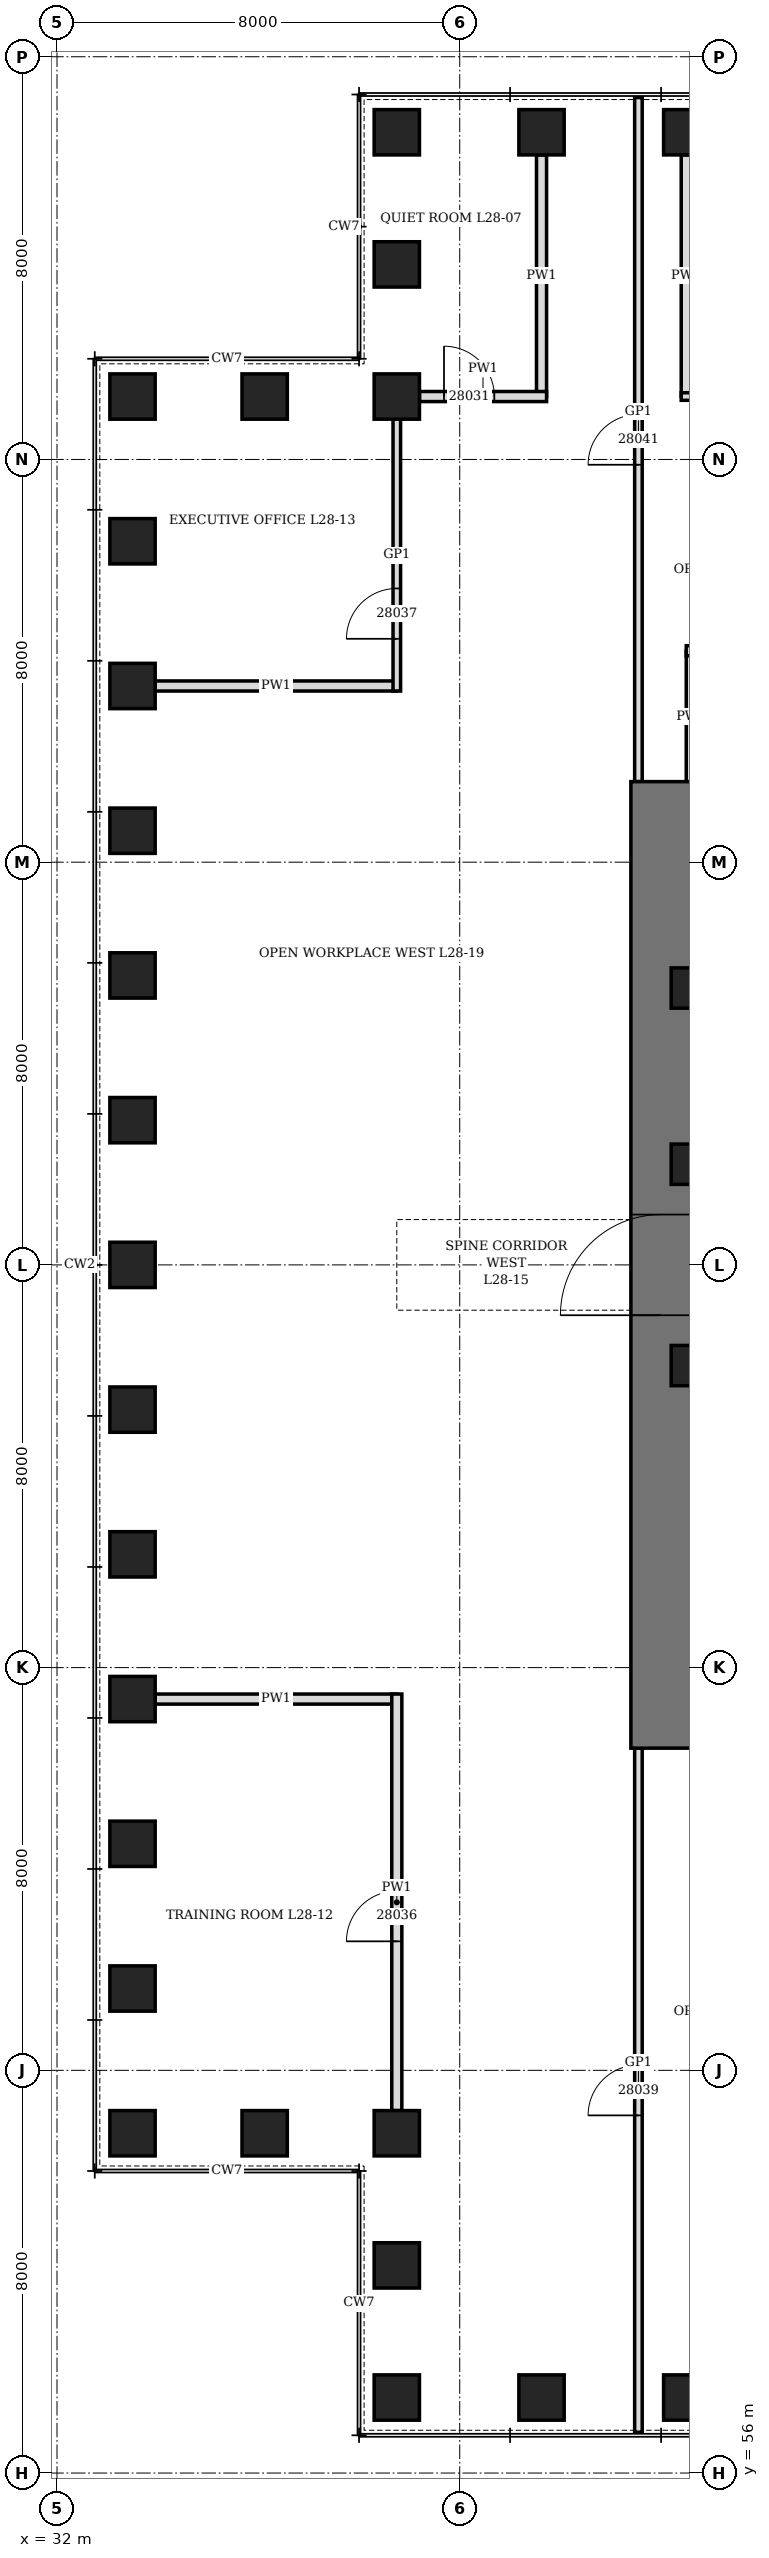
"""IFC4 building model, lengths in metres.
Left out: names, types, materials, properties, quantities, classifications, styles, units other than length and angle.
Written with IfcOpenShell. Run it as: python <this file> out.ifc"""

import sys

from ifc_helpers import new_model, si_unit, direction, frame, frame_2d, origin, origin_2d, place, context, subcontext, project, spatial, rectangle, hollow_rectangle, extrude, element, fill, save


model = new_model("IFC4")
c1 = context("Model", 3, precision=1e-05, world=origin(), true_north=direction((0.0, 1.0)))
c2 = subcontext(c1, "Body", "Model", "MODEL_VIEW")
j1 = project(units=[si_unit("LENGTHUNIT", "METRE"), si_unit("PLANEANGLEUNIT", "RADIAN")], contexts=[c1])
p1 = place(None, origin())
s1 = spatial("IfcSite", under=j1, at=p1, CompositionType="ELEMENT")
p2 = place(p1, origin())
s2 = spatial("IfcBuilding", under=s1, at=p2, CompositionType="ELEMENT")
p3 = place(p2, frame((0.0, 0.0, 129.1)))
s3 = spatial("IfcBuildingStorey", under=s2, at=p3, CompositionType="ELEMENT", Elevation=129.1)
for number, where, z_axis, x_axis in (
    (1, (38.75, 57.5, 0.0), (0.0, 0.0, 1.0), (1.0, 0.0, 0.0)),
    (2, (41.625, 57.5, 0.0), (0.0, 0.0, 1.0), (1.0, 0.0, 0.0)),
    (3, (44.5, 57.5, 0.0), (0.0, 0.0, 1.0), (1.0, 0.0, 0.0)),
    (4, (44.5, 102.5, 0.0), (0.0, 0.0, 1.0), (1.0, 0.0, 0.0)),
    (5, (41.625, 102.5, 0.0), (0.0, 0.0, 1.0), (1.0, 0.0, 0.0)),
    (6, (38.75, 102.5, 0.0), (0.0, 0.0, 1.0), (0.0, 1.0, 0.0)),
    (7, (38.75, 99.875, 0.0), (0.0, 0.0, 1.0), (0.0, 1.0, 0.0)),
    (8, (38.75, 97.25, 0.0), (0.0, 0.0, 1.0), (1.0, 0.0, 0.0)),
    (9, (36.125, 97.25, 0.0), (0.0, 0.0, 1.0), (1.0, 0.0, 0.0)),
    (10, (33.5, 97.25, 0.0), (0.0, 0.0, 1.0), (0.0, 1.0, 0.0)),
    (11, (33.5, 94.375, 0.0), (0.0, 0.0, 1.0), (0.0, 1.0, 0.0)),
    (12, (33.5, 91.5, 0.0), (0.0, 0.0, 1.0), (0.0, 1.0, 0.0)),
    (13, (33.5, 88.625, 0.0), (0.0, 0.0, 1.0), (0.0, 1.0, 0.0)),
    (14, (33.5, 85.75, 0.0), (0.0, 0.0, 1.0), (0.0, 1.0, 0.0)),
    (15, (33.5, 82.875, 0.0), (0.0, 0.0, 1.0), (0.0, 1.0, 0.0)),
    (16, (33.5, 80.0, 0.0), (0.0, 0.0, 1.0), (0.0, 1.0, 0.0)),
    (17, (33.5, 77.125, 0.0), (0.0, 0.0, 1.0), (0.0, 1.0, 0.0)),
    (18, (33.5, 74.25, 0.0), (0.0, 0.0, 1.0), (0.0, 1.0, 0.0)),
    (19, (33.5, 71.375, 0.0), (0.0, 0.0, 1.0), (0.0, 1.0, 0.0)),
    (20, (33.5, 68.5, 0.0), (0.0, 0.0, 1.0), (0.0, 1.0, 0.0)),
    (21, (33.5, 65.625, 0.0), (0.0, 0.0, 1.0), (0.0, 1.0, 0.0)),
    (22, (33.5, 62.75, 0.0), (0.0, 0.0, 1.0), (1.0, 0.0, 0.0)),
    (23, (36.125, 62.75, 0.0), (0.0, 0.0, 1.0), (1.0, 0.0, 0.0)),
    (24, (38.75, 62.75, 0.0), (0.0, 0.0, 1.0), (0.0, 1.0, 0.0)),
    (25, (38.75, 60.125, 0.0), (0.0, 0.0, 1.0), (0.0, 1.0, 0.0)),
):
    element("IfcColumn", number, at=place(p3, frame(where, z_axis=z_axis, x_axis=x_axis)), inside=s3, PredefinedType="COLUMN", context=c2, shape_type="SweptSolid", body=[
        extrude(hollow_rectangle(XDim=0.9, YDim=0.9, WallThickness=0.15, at=origin_2d()), origin(), (0.0, 0.0, 1.0), 4.2),
    ])
p4 = place(p3, frame((44.0, 70.4, 0.0), z_axis=(0.0, 0.0, 1.0), x_axis=(0.0, 1.0, 0.0)))
e26 = element("IfcWall", 26, at=p4, inside=s3, PredefinedType="SHEAR", context=c2, shape_type="SweptSolid", body=[
    extrude(rectangle(XDim=19.2, YDim=1.2, at=frame_2d((9.6, 0.0))), origin(), (0.0, 0.0, 1.0), 4.2),
])
p5 = place(p4, frame((8.6, 0.0, 0.0)))
e27 = element("IfcOpeningElement", 27, at=p5, cuts=e26, PredefinedType="OPENING", context=c2, shape_type="SweptSolid", body=[
    extrude(rectangle(XDim=2.0, YDim=2.4, at=frame_2d((1.0, 1.2))), frame((0.0, 0.61, 0.0), z_axis=(0.0, -1.0, 0.0), x_axis=(1.0, 0.0, 0.0)), (0.0, 0.0, 1.0), 1.22),
])
for number, where, z_axis, x_axis in (
    (28, (44.6, 78.0, 0.0), (0.0, 0.0, 1.0), (1.0, 0.0, 0.0)),
    (29, (44.6, 82.0, 0.0), (0.0, 0.0, 1.0), (1.0, 0.0, 0.0)),
    (30, (44.6, 85.5, 0.0), (0.0, 0.0, 1.0), (1.0, 0.0, 0.0)),
):
    element("IfcColumn", number, at=place(p3, frame(where, z_axis=z_axis, x_axis=x_axis)), inside=s3, PredefinedType="COLUMN", context=c2, shape_type="SweptSolid", body=[
        extrude(hollow_rectangle(XDim=0.8, YDim=0.8, WallThickness=0.1, at=origin_2d()), origin(), (0.0, 0.0, 1.0), 4.2),
    ])
p6 = place(p3, frame((41.625, 97.25, 0.0), z_axis=(0.0, 0.0, 1.0), x_axis=(0.0, 1.0, 0.0)))
e31 = element("IfcWall", 31, at=p6, inside=s3, PredefinedType="PARTITIONING", context=c2, shape_type="SweptSolid", body=[
    extrude(rectangle(XDim=4.8, YDim=0.2, at=frame_2d((2.4, 0.0))), origin(), (0.0, 0.0, 1.0), 3.428),
])
p7 = place(p3, frame((44.5, 97.25, 0.0), z_axis=(0.0, 0.0, 1.0), x_axis=(0.0, 1.0, 0.0)))
e32 = element("IfcWall", 32, at=p7, inside=s3, PredefinedType="PARTITIONING", context=c2, shape_type="SweptSolid", body=[
    extrude(rectangle(XDim=4.8, YDim=0.2, at=frame_2d((2.4, 0.0))), origin(), (0.0, 0.0, 1.0), 2.74),
])
for number, where, z_axis, x_axis in (
    (33, (33.95, 71.375, 0.0), (0.0, 0.0, 1.0), (1.0, 0.0, 0.0)),
    (34, (33.95, 91.5, 0.0), (0.0, 0.0, 1.0), (1.0, 0.0, 0.0)),
):
    element("IfcWall", number, at=place(p3, frame(where, z_axis=z_axis, x_axis=x_axis)), inside=s3, PredefinedType="PARTITIONING", context=c2, shape_type="SweptSolid", body=[
        extrude(rectangle(XDim=4.8, YDim=0.2, at=frame_2d((2.4, 0.0))), origin(), (0.0, 0.0, 1.0), 3.428),
    ])
p8 = place(p3, frame((44.6, 89.6, 0.0), z_axis=(0.0, 0.0, 1.0), x_axis=(0.0, 1.0, 0.0)))
e35 = element("IfcWall", 35, at=p8, inside=s3, PredefinedType="PARTITIONING", context=c2, shape_type="SweptSolid", body=[
    extrude(rectangle(XDim=2.6, YDim=0.2, at=frame_2d((1.3, 0.0))), origin(), (0.0, 0.0, 1.0), 2.74),
])
p9 = place(p3, frame((44.5, 92.2, 0.0), z_axis=(0.0, 0.0, 1.0), x_axis=(1.0, 0.0, 0.0)))
e36 = element("IfcWall", 36, at=p9, inside=s3, PredefinedType="PARTITIONING", context=c2, shape_type="SweptSolid", body=[
    extrude(rectangle(XDim=6.4, YDim=0.2, at=frame_2d((3.2, 0.0))), origin(), (0.0, 0.0, 1.0), 4.04),
])
p10 = place(p9, frame((3.175, 0.0, 0.0)))
e37 = element("IfcOpeningElement", 37, at=p10, cuts=e36, PredefinedType="OPENING", context=c2, shape_type="SweptSolid", body=[
    extrude(rectangle(XDim=1.0, YDim=2.1, at=frame_2d((0.5, 1.05))), frame((0.0, 0.11, 0.0), z_axis=(0.0, -1.0, 0.0), x_axis=(1.0, 0.0, 0.0)), (0.0, 0.0, 1.0), 0.22),
])
p11 = place(p3, frame((44.4, 97.25, 0.0), z_axis=(0.0, 0.0, 1.0), x_axis=(1.0, 0.0, 0.0)))
e38 = element("IfcWall", 38, at=p11, inside=s3, PredefinedType="PARTITIONING", context=c2, shape_type="SweptSolid", body=[
    extrude(rectangle(XDim=17.45, YDim=0.15, at=frame_2d((8.725, 0.0))), origin(), (0.0, 0.0, 1.0), 4.04),
])
p12 = place(p11, frame((1.038, 0.0, 0.0)))
e39 = element("IfcOpeningElement", 39, at=p12, cuts=e38, PredefinedType="OPENING", context=c2, shape_type="SweptSolid", body=[
    extrude(rectangle(XDim=1.0, YDim=2.1, at=frame_2d((0.5, 1.05))), frame((0.0, 0.085, 0.0), z_axis=(0.0, -1.0, 0.0), x_axis=(1.0, 0.0, 0.0)), (0.0, 0.0, 1.0), 0.17),
])
p13 = place(p11, frame((6.788, 0.0, 0.0)))
e40 = element("IfcOpeningElement", 40, at=p13, cuts=e38, PredefinedType="OPENING", context=c2, shape_type="SweptSolid", body=[
    extrude(rectangle(XDim=1.0, YDim=2.1, at=frame_2d((0.5, 1.05))), frame((0.0, 0.085, 0.0), z_axis=(0.0, -1.0, 0.0), x_axis=(1.0, 0.0, 0.0)), (0.0, 0.0, 1.0), 0.17),
])
p14 = place(p11, frame((12.538, 0.0, 0.0)))
e41 = element("IfcOpeningElement", 41, at=p14, cuts=e38, PredefinedType="OPENING", context=c2, shape_type="SweptSolid", body=[
    extrude(rectangle(XDim=1.0, YDim=2.1, at=frame_2d((0.5, 1.05))), frame((0.0, 0.085, 0.0), z_axis=(0.0, -1.0, 0.0), x_axis=(1.0, 0.0, 0.0)), (0.0, 0.0, 1.0), 0.17),
])
p15 = place(p3, frame((39.2, 97.25, 0.0), z_axis=(0.0, 0.0, 1.0), x_axis=(1.0, 0.0, 0.0)))
e42 = element("IfcWall", 42, at=p15, inside=s3, PredefinedType="PARTITIONING", context=c2, shape_type="SweptSolid", body=[
    extrude(rectangle(XDim=2.525, YDim=0.2, at=frame_2d((1.263, 0.0))), origin(), (0.0, 0.0, 1.0), 4.04),
])
p16 = place(p15, frame((0.488, 0.0, 0.0)))
e43 = element("IfcOpeningElement", 43, at=p16, cuts=e42, PredefinedType="OPENING", context=c2, shape_type="SweptSolid", body=[
    extrude(rectangle(XDim=1.0, YDim=2.1, at=frame_2d((0.5, 1.05))), frame((0.0, 0.11, 0.0), z_axis=(0.0, -1.0, 0.0), x_axis=(1.0, 0.0, 0.0)), (0.0, 0.0, 1.0), 0.22),
])
p17 = place(p3, frame((38.75, 91.4, 0.0), z_axis=(0.0, 0.0, 1.0), x_axis=(0.0, 1.0, 0.0)))
e44 = element("IfcWall", 44, at=p17, inside=s3, PredefinedType="PARTITIONING", context=c2, shape_type="SweptSolid", body=[
    extrude(rectangle(XDim=5.4, YDim=0.15, at=frame_2d((2.7, 0.0))), origin(), (0.0, 0.0, 1.0), 4.04),
])
p18 = place(p17, frame((1.038, 0.0, 0.0)))
e45 = element("IfcOpeningElement", 45, at=p18, cuts=e44, PredefinedType="OPENING", context=c2, shape_type="SweptSolid", body=[
    extrude(rectangle(XDim=1.0, YDim=2.1, at=frame_2d((0.5, 1.05))), frame((0.0, 0.085, 0.0), z_axis=(0.0, -1.0, 0.0), x_axis=(1.0, 0.0, 0.0)), (0.0, 0.0, 1.0), 0.17),
])
p19 = place(p3, frame((38.75, 63.2, 0.0), z_axis=(0.0, 0.0, 1.0), x_axis=(0.0, 1.0, 0.0)))
e46 = element("IfcWall", 46, at=p19, inside=s3, PredefinedType="PARTITIONING", context=c2, shape_type="SweptSolid", body=[
    extrude(rectangle(XDim=8.275, YDim=0.2, at=frame_2d((4.138, 0.0))), origin(), (0.0, 0.0, 1.0), 4.04),
])
p20 = place(p19, frame((3.363, 0.0, 0.0)))
e47 = element("IfcOpeningElement", 47, at=p20, cuts=e46, PredefinedType="OPENING", context=c2, shape_type="SweptSolid", body=[
    extrude(rectangle(XDim=1.0, YDim=2.1, at=frame_2d((0.5, 1.05))), frame((0.0, 0.11, 0.0), z_axis=(0.0, -1.0, 0.0), x_axis=(1.0, 0.0, 0.0)), (0.0, 0.0, 1.0), 0.22),
])
p21 = place(p3, frame((43.55, 56.81, 0.0), z_axis=(0.0, 0.0, 1.0), x_axis=(0.0, 1.0, 0.0)))
e48 = element("IfcWall", 48, at=p21, inside=s3, PredefinedType="PARTITIONING", context=c2, shape_type="SweptSolid", body=[
    extrude(rectangle(XDim=13.59, YDim=0.15, at=frame_2d((6.795, 0.0))), origin(), (0.0, 0.0, 1.0), 4.04),
])
p22 = place(p21, frame((6.295, 0.0, 0.0)))
e49 = element("IfcOpeningElement", 49, at=p22, cuts=e48, PredefinedType="OPENING", context=c2, shape_type="SweptSolid", body=[
    extrude(rectangle(XDim=1.0, YDim=2.4, at=frame_2d((0.5, 1.2))), frame((0.0, 0.085, 0.0), z_axis=(0.0, -1.0, 0.0), x_axis=(1.0, 0.0, 0.0)), (0.0, 0.0, 1.0), 0.17),
])
p23 = place(p3, frame((43.55, 89.6, 0.0), z_axis=(0.0, 0.0, 1.0), x_axis=(0.0, 1.0, 0.0)))
e50 = element("IfcWall", 50, at=p23, inside=s3, PredefinedType="PARTITIONING", context=c2, shape_type="SweptSolid", body=[
    extrude(rectangle(XDim=13.59, YDim=0.15, at=frame_2d((6.795, 0.0))), origin(), (0.0, 0.0, 1.0), 4.04),
])
p24 = place(p23, frame((6.295, 0.0, 0.0)))
e51 = element("IfcOpeningElement", 51, at=p24, cuts=e50, PredefinedType="OPENING", context=c2, shape_type="SweptSolid", body=[
    extrude(rectangle(XDim=1.0, YDim=2.4, at=frame_2d((0.5, 1.2))), frame((0.0, 0.085, 0.0), z_axis=(0.0, -1.0, 0.0), x_axis=(1.0, 0.0, 0.0)), (0.0, 0.0, 1.0), 0.17),
])
p25 = place(p5, origin())
e52 = element("IfcDoor", 52, at=p25, inside=s3, OperationType="DOUBLE_DOOR_SINGLE_SWING", PredefinedType="DOOR", context=c2, shape_type="SweptSolid", body=[
    extrude(rectangle(XDim=2.0, YDim=2.4, at=frame_2d((1.0, 1.2))), frame((0.0, 0.35, 0.0), z_axis=(0.0, -1.0, 0.0), x_axis=(1.0, 0.0, 0.0)), (0.0, 0.0, 1.0), 0.7),
])
fill(e27, e52)
p26 = place(p16, origin())
e53 = element("IfcDoor", 53, at=p26, inside=s3, OperationType="SINGLE_SWING_LEFT", PredefinedType="DOOR", context=c2, shape_type="SweptSolid", body=[
    extrude(rectangle(XDim=1.0, YDim=2.1, at=frame_2d((0.5, 1.05))), frame((0.0, 0.1, 0.0), z_axis=(0.0, -1.0, 0.0), x_axis=(1.0, 0.0, 0.0)), (0.0, 0.0, 1.0), 0.199),
])
fill(e43, e53)
p27 = place(p20, origin())
e54 = element("IfcDoor", 54, at=p27, inside=s3, OperationType="SINGLE_SWING_LEFT", PredefinedType="DOOR", context=c2, shape_type="SweptSolid", body=[
    extrude(rectangle(XDim=1.0, YDim=2.1, at=frame_2d((0.5, 1.05))), frame((0.0, 0.1, 0.0), z_axis=(0.0, -1.0, 0.0), x_axis=(1.0, 0.0, 0.0)), (0.0, 0.0, 1.0), 0.199),
])
fill(e47, e54)
p28 = place(p18, origin())
e55 = element("IfcDoor", 55, at=p28, inside=s3, OperationType="SINGLE_SWING_LEFT", PredefinedType="DOOR", context=c2, shape_type="SweptSolid", body=[
    extrude(rectangle(XDim=1.0, YDim=2.1, at=frame_2d((0.5, 1.05))), frame((0.0, 0.075, 0.0), z_axis=(0.0, -1.0, 0.0), x_axis=(1.0, 0.0, 0.0)), (0.0, 0.0, 1.0), 0.149),
])
fill(e45, e55)
p29 = place(p22, origin())
e56 = element("IfcDoor", 56, at=p29, inside=s3, OperationType="SINGLE_SWING_RIGHT", PredefinedType="DOOR", context=c2, shape_type="SweptSolid", body=[
    extrude(rectangle(XDim=1.0, YDim=2.4, at=frame_2d((0.5, 1.2))), frame((0.0, 0.075, 0.0), z_axis=(0.0, -1.0, 0.0), x_axis=(1.0, 0.0, 0.0)), (0.0, 0.0, 1.0), 0.149),
])
fill(e49, e56)
p30 = place(p24, origin())
e57 = element("IfcDoor", 57, at=p30, inside=s3, OperationType="SINGLE_SWING_RIGHT", PredefinedType="DOOR", context=c2, shape_type="SweptSolid", body=[
    extrude(rectangle(XDim=1.0, YDim=2.4, at=frame_2d((0.5, 1.2))), frame((0.0, 0.075, 0.0), z_axis=(0.0, -1.0, 0.0), x_axis=(1.0, 0.0, 0.0)), (0.0, 0.0, 1.0), 0.149),
])
fill(e51, e57)
save(model, sys.argv[1])
